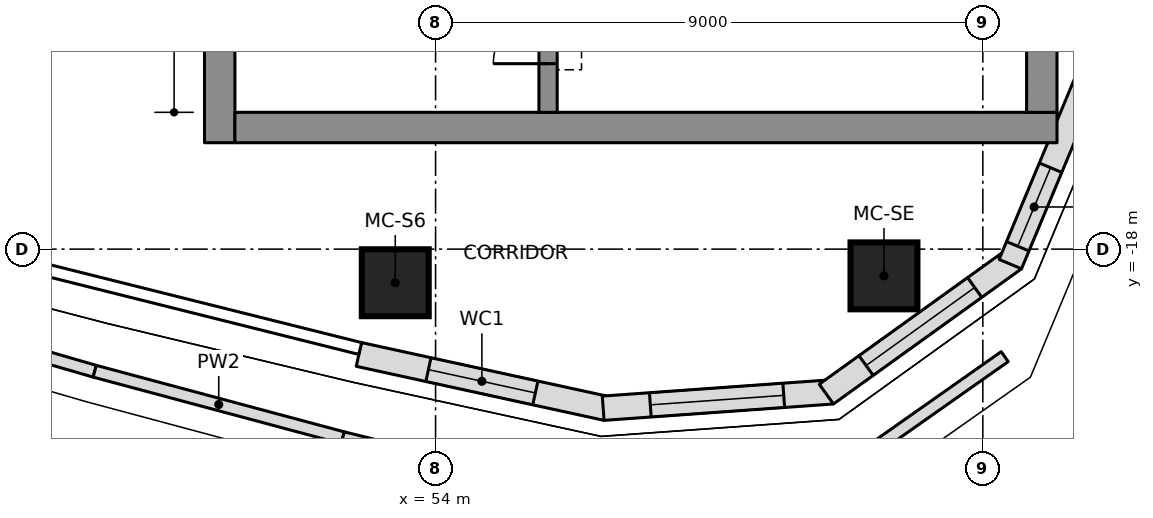
"""IFC4 building model, lengths in metres.
Left out: names, types, materials, properties, quantities, classifications, styles, units other than length and angle.
Written with IfcOpenShell. Run it as: python <this file> out.ifc"""

import sys

from ifc_helpers import new_model, si_unit, direction, frame, frame_2d, origin, origin_2d, place, context, subcontext, project, spatial, polyline, rectangle, outline, extrude, element, fill, save


model = new_model("IFC4")
c1 = context("Model", 3, precision=1e-05, world=origin(), true_north=direction((0.0, 1.0)))
c2 = subcontext(c1, "Body", "Model", "MODEL_VIEW")
j1 = project(units=[si_unit("LENGTHUNIT", "METRE"), si_unit("PLANEANGLEUNIT", "RADIAN")], contexts=[c1])
p1 = place(None, origin())
s1 = spatial("IfcSite", under=j1, at=p1, CompositionType="ELEMENT")
p2 = place(p1, origin())
s2 = spatial("IfcBuilding", under=s1, at=p2, CompositionType="ELEMENT")
p3 = place(p2, frame((0.0, 0.0, 263.3)))
s3 = spatial("IfcBuildingStorey", under=s2, at=p3, CompositionType="ELEMENT", Elevation=263.3)
p4 = place(p3, frame((50.45, -16.25, 0.0), z_axis=(0.0, 0.0, 1.0), x_axis=(0.0, 1.0, 0.0)))
e1 = element("IfcWall", 1, at=p4, inside=s3, PredefinedType="SHEAR", context=c2, shape_type="SweptSolid", body=[
    extrude(rectangle(XDim=9.6, YDim=0.5, at=frame_2d((4.8, 0.0))), origin(), (0.0, 0.0, 1.0), 4.6),
])
p5 = place(p4, frame((2.0, 0.0, 0.0)))
e2 = element("IfcOpeningElement", 2, at=p5, cuts=e1, PredefinedType="OPENING", context=c2, shape_type="SweptSolid", body=[
    extrude(rectangle(XDim=1.1, YDim=2.1, at=frame_2d((0.55, 1.05))), frame((0.0, 0.26, 0.0), z_axis=(0.0, -1.0, 0.0), x_axis=(1.0, 0.0, 0.0)), (0.0, 0.0, 1.0), 0.52),
])
p6 = place(p3, frame((50.7, -16.0, 0.0), z_axis=(0.0, 0.0, 1.0), x_axis=(1.0, 0.0, 0.0)))
e3 = element("IfcWall", 3, at=p6, inside=s3, PredefinedType="SHEAR", context=c2, shape_type="SweptSolid", body=[
    extrude(rectangle(XDim=13.52, YDim=0.5, at=frame_2d((6.76, 0.0))), origin(), (0.0, 0.0, 1.0), 4.6),
])
p7 = place(p3, frame((63.97, -15.75, 0.0), z_axis=(0.0, 0.0, 1.0), x_axis=(0.0, 1.0, 0.0)))
e4 = element("IfcWall", 4, at=p7, inside=s3, PredefinedType="SHEAR", context=c2, shape_type="SweptSolid", body=[
    extrude(rectangle(XDim=8.847, YDim=0.5, at=frame_2d((4.423, 0.0))), origin(), (0.0, 0.0, 1.0), 4.6),
])
p8 = place(p3, frame((55.85, -15.75, 0.0), z_axis=(0.0, 0.0, 1.0), x_axis=(0.0, 1.0, 0.0)))
e5 = element("IfcWall", 5, at=p8, inside=s3, PredefinedType="SHEAR", context=c2, shape_type="SweptSolid", body=[
    extrude(rectangle(XDim=5.4, YDim=0.3, at=frame_2d((2.7, 0.0))), origin(), (0.0, 0.0, 1.0), 4.6),
])
p9 = place(p8, frame((3.6, 0.0, 0.0)))
e6 = element("IfcOpeningElement", 6, at=p9, cuts=e5, PredefinedType="OPENING", context=c2, shape_type="SweptSolid", body=[
    extrude(rectangle(XDim=1.1, YDim=2.1, at=frame_2d((0.55, 1.05))), frame((0.0, 0.16, 0.0), z_axis=(0.0, -1.0, 0.0), x_axis=(1.0, 0.0, 0.0)), (0.0, 0.0, 1.0), 0.32),
])
p10 = place(p8, frame((0.8, 0.0, 0.0)))
e7 = element("IfcOpeningElement", 7, at=p10, cuts=e5, PredefinedType="OPENING", context=c2, shape_type="SweptSolid", body=[
    extrude(rectangle(XDim=0.9, YDim=2.1, at=frame_2d((0.45, 1.05))), frame((0.0, 0.16, 0.0), z_axis=(0.0, -1.0, 0.0), x_axis=(1.0, 0.0, 0.0)), (0.0, 0.0, 1.0), 0.32),
])
for number, where, z_axis, x_axis in (
    (8, (53.337, -18.553, 0.0), (0.0, 0.0, 1.0), (1.0, 0.0, 0.0)),
    (9, (61.374, -18.44, 0.0), (0.0, 0.0, 1.0), (1.0, 0.0, 0.0)),
):
    element("IfcColumn", number, at=place(p3, frame(where, z_axis=z_axis, x_axis=x_axis)), inside=s3, PredefinedType="COLUMN", context=c2, shape_type="SweptSolid", body=[
        extrude(rectangle(XDim=1.1, YDim=1.1, at=origin_2d()), origin(), (0.0, 0.0, 1.0), 4.6),
    ])
p11 = place(p3, frame((52.738, -19.732, 0.0), z_axis=(0.0, 0.0, 1.0), x_axis=(0.977020225348, -0.213146614471, 0.0)))
e10 = element("IfcWall", 10, at=p11, inside=s3, PredefinedType="NOTDEFINED", context=c2, shape_type="SweptSolid", body=[
    extrude(outline(polyline([(0.0, -0.2), (4.171, -0.2), (4.113, 0.2), (0.0, 0.2), (0.0, -0.2)])), origin(), (0.0, 0.0, 1.0), 4.3),
])
p12 = place(p11, frame((1.171, 0.0, 1.8)))
e11 = element("IfcOpeningElement", 11, at=p12, cuts=e10, PredefinedType="OPENING", context=c2, shape_type="SweptSolid", body=[
    extrude(rectangle(XDim=1.8, YDim=1.2, at=frame_2d((0.9, 0.6))), frame((0.0, 0.21, 0.0), z_axis=(0.0, -1.0, 0.0), x_axis=(1.0, 0.0, 0.0)), (0.0, 0.0, 1.0), 0.42),
])
p13 = place(p3, frame((56.785, -20.615, 0.0), z_axis=(0.0, 0.0, 1.0), x_axis=(0.99746272096, 0.071190731806, 0.0)))
e12 = element("IfcWall", 12, at=p13, inside=s3, PredefinedType="NOTDEFINED", context=c2, shape_type="SweptSolid", body=[
    extrude(outline(polyline([(-0.029, -0.2), (3.753, -0.2), (3.64, 0.2), (0.029, 0.2), (-0.029, -0.2)])), origin(), (0.0, 0.0, 1.0), 4.3),
])
p14 = place(p13, frame((0.748, 0.0, 0.6)))
e13 = element("IfcOpeningElement", 13, at=p14, cuts=e12, PredefinedType="OPENING", context=c2, shape_type="SweptSolid", body=[
    extrude(outline(polyline([(0.0, 1.35), (0.084, 1.771), (0.322, 2.128), (0.679, 2.366), (1.1, 2.45), (1.521, 2.366), (1.878, 2.128), (2.116, 1.771), (2.2, 1.35), (2.2, 1.1), (2.116, 0.679), (1.878, 0.322), (1.521, 0.084), (1.1, 0.0), (0.679, 0.084), (0.322, 0.322), (0.084, 0.679), (0.0, 1.1), (0.0, 1.35)])), frame((0.0, 0.21, 0.0), z_axis=(0.0, -1.0, 0.0), x_axis=(1.0, 0.0, 0.0)), (0.0, 0.0, 1.0), 0.42),
])
p15 = place(p3, frame((60.472, -20.352, 0.0), z_axis=(0.0, 0.0, 1.0), x_axis=(0.811962548682, 0.583709533533, 0.0)))
e14 = element("IfcWall", 14, at=p15, inside=s3, PredefinedType="NOTDEFINED", context=c2, shape_type="SweptSolid", body=[
    extrude(outline(polyline([(-0.057, -0.2), (3.753, -0.2), (3.64, 0.2), (0.057, 0.2), (-0.057, -0.2)])), origin(), (0.0, 0.0, 1.0), 4.3),
])
p16 = place(p15, frame((0.748, 0.0, 0.6)))
e15 = element("IfcOpeningElement", 15, at=p16, cuts=e14, PredefinedType="OPENING", context=c2, shape_type="SweptSolid", body=[
    extrude(outline(polyline([(0.0, 1.35), (0.084, 1.771), (0.322, 2.128), (0.679, 2.366), (1.1, 2.45), (1.521, 2.366), (1.878, 2.128), (2.116, 1.771), (2.2, 1.35), (2.2, 1.1), (2.116, 0.679), (1.878, 0.322), (1.521, 0.084), (1.1, 0.0), (0.679, 0.084), (0.322, 0.322), (0.084, 0.679), (0.0, 1.1), (0.0, 1.35)])), frame((0.0, 0.21, 0.0), z_axis=(0.0, -1.0, 0.0), x_axis=(1.0, 0.0, 0.0)), (0.0, 0.0, 1.0), 0.42),
])
p17 = place(p3, frame((63.474, -18.194, 0.0), z_axis=(0.0, 0.0, 1.0), x_axis=(0.385285857918, 0.922797273343, 0.0)))
e16 = element("IfcWall", 16, at=p17, inside=s3, PredefinedType="NOTDEFINED", context=c2, shape_type="SweptSolid", body=[
    extrude(outline(polyline([(-0.057, -0.2), (3.726, -0.2), (3.667, 0.2), (0.057, 0.2), (-0.057, -0.2)])), origin(), (0.0, 0.0, 1.0), 4.3),
])
p18 = place(p17, frame((0.261, 0.0, 0.6)))
e17 = element("IfcOpeningElement", 17, at=p18, cuts=e16, PredefinedType="OPENING", context=c2, shape_type="SweptSolid", body=[
    extrude(outline(polyline([(0.0, 1.75), (0.053, 2.018), (0.205, 2.245), (0.432, 2.397), (0.7, 2.45), (0.968, 2.397), (1.195, 2.245), (1.347, 2.018), (1.4, 1.75), (1.4, 0.7), (1.347, 0.432), (1.195, 0.205), (0.968, 0.053), (0.7, 0.0), (0.432, 0.053), (0.205, 0.205), (0.053, 0.432), (0.0, 0.7), (0.0, 1.75)])), frame((0.0, 0.21, 0.0), z_axis=(0.0, -1.0, 0.0), x_axis=(1.0, 0.0, 0.0)), (0.0, 0.0, 1.0), 0.42),
])
p19 = place(p3, frame((44.338, -18.833, 0.0), z_axis=(0.0, 0.0, 1.0), x_axis=(0.960476446862, -0.278361267103, 0.0)))
e18 = element("IfcWall", 18, at=p19, inside=s3, PredefinedType="PARAPET", context=c2, shape_type="SweptSolid", body=[
    extrude(rectangle(XDim=4.223, YDim=0.2, at=frame_2d((2.112, 0.0))), origin(), (0.0, 0.0, 1.0), 1.1),
])
p20 = place(p3, frame((48.395, -20.008, 0.0), z_axis=(0.0, 0.0, 1.0), x_axis=(0.965877060865, -0.259000971609, 0.0)))
e19 = element("IfcWall", 19, at=p20, inside=s3, PredefinedType="PARAPET", context=c2, shape_type="SweptSolid", body=[
    extrude(rectangle(XDim=4.223, YDim=0.2, at=frame_2d((2.111, 0.0))), origin(), (0.0, 0.0, 1.0), 1.1),
])
p21 = place(p3, frame((52.473, -21.102, 0.0), z_axis=(0.0, 0.0, 1.0), x_axis=(0.970892517903, -0.239515591724, 0.0)))
e20 = element("IfcWall", 20, at=p21, inside=s3, PredefinedType="PARAPET", context=c2, shape_type="SweptSolid", body=[
    extrude(rectangle(XDim=4.186, YDim=0.2, at=frame_2d((2.093, 0.0))), origin(), (0.0, 0.0, 1.0), 1.1),
])
p22 = place(p3, frame((60.306, -21.917, 0.0), z_axis=(0.0, 0.0, 1.0), x_axis=(0.817908975585, 0.575347640699, 0.0)))
e21 = element("IfcWall", 21, at=p22, inside=s3, PredefinedType="PARAPET", context=c2, shape_type="SweptSolid", body=[
    extrude(rectangle(XDim=3.734, YDim=0.2, at=frame_2d((1.867, 0.0))), origin(), (0.0, 0.0, 1.0), 1.1),
])
p23 = place(p3, frame((44.874, -17.579, 0.0), z_axis=(0.0, 0.0, 1.0), x_axis=(0.327705598625, 0.944779890043, 0.0)))
e22 = element("IfcWall", 22, at=p23, inside=s3, PredefinedType="PARTITIONING", context=c2, shape_type="SweptSolid", body=[
    extrude(rectangle(XDim=9.61, YDim=0.2, at=frame_2d((4.805, 0.0))), origin(), (0.0, 0.0, 1.0), 4.3),
])
p24 = place(p12, origin())
e23 = element("IfcWindow", 23, at=p24, inside=s3, PartitioningType="SINGLE_PANEL", PredefinedType="WINDOW", context=c2, shape_type="SweptSolid", body=[
    extrude(rectangle(XDim=1.8, YDim=1.2, at=frame_2d((0.9, 0.6))), frame((0.0, 0.17, 0.0), z_axis=(0.0, -1.0, 0.0), x_axis=(1.0, 0.0, 0.0)), (0.0, 0.0, 1.0), 0.06),
])
fill(e11, e23)
p25 = place(p14, origin())
e24 = element("IfcWindow", 24, at=p25, inside=s3, PartitioningType="SINGLE_PANEL", PredefinedType="WINDOW", context=c2, shape_type="SweptSolid", body=[
    extrude(outline(polyline([(0.0, 1.35), (0.084, 1.771), (0.322, 2.128), (0.679, 2.366), (1.1, 2.45), (1.521, 2.366), (1.878, 2.128), (2.116, 1.771), (2.2, 1.35), (2.2, 1.1), (2.116, 0.679), (1.878, 0.322), (1.521, 0.084), (1.1, 0.0), (0.679, 0.084), (0.322, 0.322), (0.084, 0.679), (0.0, 1.1), (0.0, 1.35)])), frame((0.0, 0.17, 0.0), z_axis=(0.0, -1.0, 0.0), x_axis=(1.0, 0.0, 0.0)), (0.0, 0.0, 1.0), 0.06),
])
fill(e13, e24)
p26 = place(p16, origin())
e25 = element("IfcWindow", 25, at=p26, inside=s3, PartitioningType="SINGLE_PANEL", PredefinedType="WINDOW", context=c2, shape_type="SweptSolid", body=[
    extrude(outline(polyline([(0.0, 1.35), (0.084, 1.771), (0.322, 2.128), (0.679, 2.366), (1.1, 2.45), (1.521, 2.366), (1.878, 2.128), (2.116, 1.771), (2.2, 1.35), (2.2, 1.1), (2.116, 0.679), (1.878, 0.322), (1.521, 0.084), (1.1, 0.0), (0.679, 0.084), (0.322, 0.322), (0.084, 0.679), (0.0, 1.1), (0.0, 1.35)])), frame((0.0, 0.17, 0.0), z_axis=(0.0, -1.0, 0.0), x_axis=(1.0, 0.0, 0.0)), (0.0, 0.0, 1.0), 0.06),
])
fill(e15, e25)
p27 = place(p18, origin())
e26 = element("IfcWindow", 26, at=p27, inside=s3, PartitioningType="SINGLE_PANEL", PredefinedType="WINDOW", context=c2, shape_type="SweptSolid", body=[
    extrude(outline(polyline([(0.0, 1.75), (0.053, 2.018), (0.205, 2.245), (0.432, 2.397), (0.7, 2.45), (0.968, 2.397), (1.195, 2.245), (1.347, 2.018), (1.4, 1.75), (1.4, 0.7), (1.347, 0.432), (1.195, 0.205), (0.968, 0.053), (0.7, 0.0), (0.432, 0.053), (0.205, 0.205), (0.053, 0.432), (0.0, 0.7), (0.0, 1.75)])), frame((0.0, 0.17, 0.0), z_axis=(0.0, -1.0, 0.0), x_axis=(1.0, 0.0, 0.0)), (0.0, 0.0, 1.0), 0.06),
])
fill(e17, e26)
p28 = place(p10, origin())
e27 = element("IfcDoor", 27, at=p28, inside=s3, OperationType="SINGLE_SWING_LEFT", PredefinedType="DOOR", context=c2, shape_type="SweptSolid", body=[
    extrude(rectangle(XDim=0.9, YDim=2.1, at=frame_2d((0.45, 1.05))), frame((0.0, 0.025, 0.0), z_axis=(0.0, -1.0, 0.0), x_axis=(1.0, 0.0, 0.0)), (0.0, 0.0, 1.0), 0.05),
])
fill(e7, e27)
save(model, sys.argv[1])
